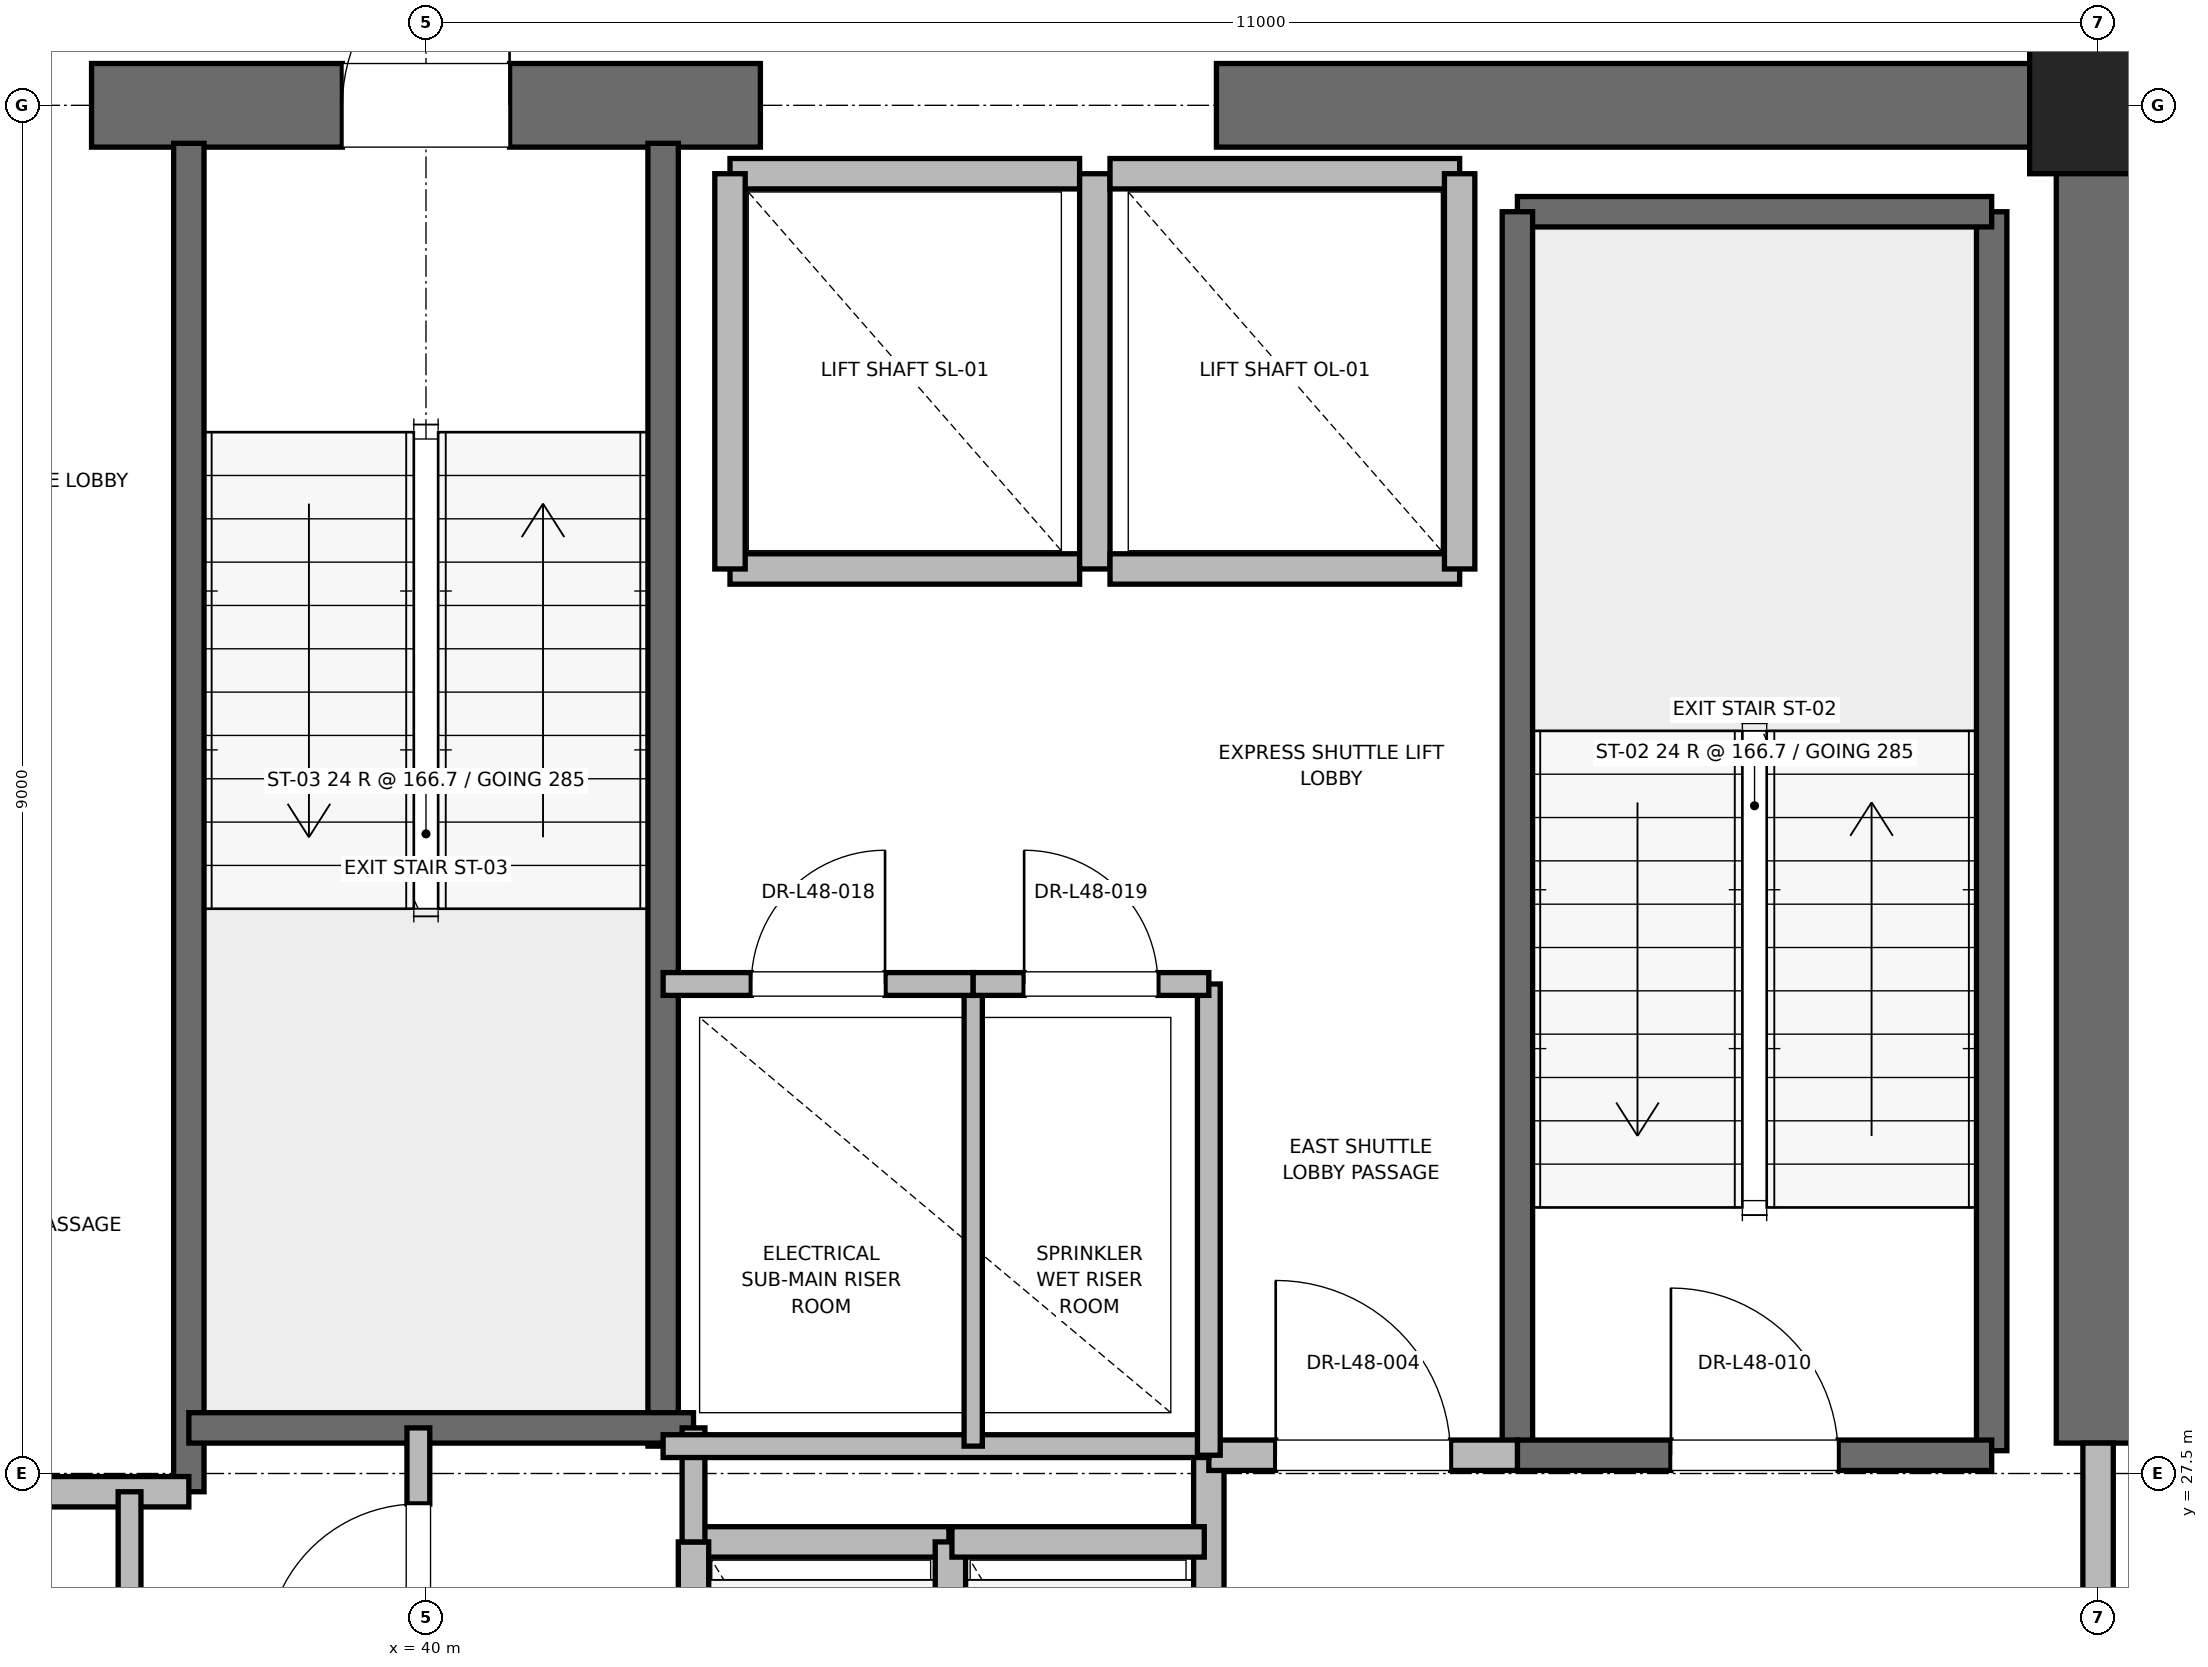
"""IFC4 building model, lengths in metres.
Left out: names, types, materials, properties, quantities, classifications, styles, units other than length and angle.
Written with IfcOpenShell. Run it as: python <this file> out.ifc"""

import sys

from ifc_helpers import new_model, si_unit, direction, frame, frame_2d, origin, origin_2d, place, context, subcontext, project, spatial, rectangle, extrude, element, fill, save


model = new_model("IFC4")
c1 = context("Model", 3, precision=1e-05, world=origin(), true_north=direction((0.0, 1.0)))
c2 = subcontext(c1, "Body", "Model", "MODEL_VIEW")
j1 = project(units=[si_unit("LENGTHUNIT", "METRE"), si_unit("PLANEANGLEUNIT", "RADIAN")], contexts=[c1])
p1 = place(None, origin())
s1 = spatial("IfcSite", under=j1, at=p1, CompositionType="ELEMENT")
p2 = place(p1, origin())
s2 = spatial("IfcBuilding", under=s1, at=p2, CompositionType="ELEMENT")
p3 = place(p2, frame((0.0, 0.0, 209.2)))
s3 = spatial("IfcBuildingStorey", under=s2, at=p3, CompositionType="ELEMENT", Elevation=209.2)
p4 = place(p3, frame((51.0, 36.5, 0.0), z_axis=(0.0, 0.0, 1.0), x_axis=(1.0, 0.0, 0.0)))
e1 = element("IfcColumn", 1, at=p4, inside=s3, PredefinedType="PILASTER", context=c2, shape_type="SweptSolid", body=[
    extrude(rectangle(XDim=0.9, YDim=0.9, at=origin_2d()), origin(), (0.0, 0.0, 1.0), 4.0),
])
p5 = place(p3, frame((37.8, 36.5, 0.0), z_axis=(0.0, 0.0, 1.0), x_axis=(1.0, 0.0, 0.0)))
e2 = element("IfcWall", 2, at=p5, inside=s3, PredefinedType="SHEAR", context=c2, shape_type="SweptSolid", body=[
    extrude(rectangle(XDim=4.4, YDim=0.55, at=frame_2d((2.2, 0.0))), origin(), (0.0, 0.0, 1.0), 3.775),
])
p6 = place(p5, frame((1.65, 0.0, 0.0)))
e3 = element("IfcOpeningElement", 3, at=p6, cuts=e2, PredefinedType="OPENING", context=c2, shape_type="SweptSolid", body=[
    extrude(rectangle(XDim=1.1, YDim=2.15, at=frame_2d((0.55, 1.075))), frame((0.0, 0.275, 0.0), z_axis=(0.0, -1.0, 0.0), x_axis=(1.0, 0.0, 0.0)), (0.0, 0.0, 1.0), 0.55),
])
p7 = place(p3, frame((45.2, 36.5, 0.0), z_axis=(0.0, 0.0, 1.0), x_axis=(1.0, 0.0, 0.0)))
e4 = element("IfcWall", 4, at=p7, inside=s3, PredefinedType="SHEAR", context=c2, shape_type="SweptSolid", body=[
    extrude(rectangle(XDim=5.8, YDim=0.55, at=frame_2d((2.9, 0.0))), origin(), (0.0, 0.0, 1.0), 3.775),
])
p8 = place(p3, frame((51.0, 27.7, 0.0), z_axis=(0.0, 0.0, 1.0), x_axis=(0.0, 1.0, 0.0)))
e5 = element("IfcWall", 5, at=p8, inside=s3, PredefinedType="SHEAR", context=c2, shape_type="SweptSolid", body=[
    extrude(rectangle(XDim=8.8, YDim=0.55, at=frame_2d((4.4, 0.0))), origin(), (0.0, 0.0, 1.0), 3.775),
])
p9 = place(p3, frame((50.3, 27.65, 0.0), z_axis=(0.0, 0.0, 1.0), x_axis=(0.0, 1.0, 0.0)))
e6 = element("IfcWall", 6, at=p9, inside=s3, PredefinedType="SOLIDWALL", context=c2, shape_type="SweptSolid", body=[
    extrude(rectangle(XDim=8.15, YDim=0.2, at=frame_2d((4.075, 0.0))), origin(), (0.0, 0.0, 1.0), 3.775),
])
p10 = place(p3, frame((47.18, 35.8, 0.0), z_axis=(0.0, 0.0, 1.0), x_axis=(1.0, 0.0, 0.0)))
e7 = element("IfcWall", 7, at=p10, inside=s3, PredefinedType="SOLIDWALL", context=c2, shape_type="SweptSolid", body=[
    extrude(rectangle(XDim=3.12, YDim=0.2, at=frame_2d((1.56, 0.0))), origin(), (0.0, 0.0, 1.0), 3.775),
])
p11 = place(p3, frame((47.18, 27.62, 0.0), z_axis=(0.0, 0.0, 1.0), x_axis=(0.0, 1.0, 0.0)))
e8 = element("IfcWall", 8, at=p11, inside=s3, PredefinedType="SOLIDWALL", context=c2, shape_type="SweptSolid", body=[
    extrude(rectangle(XDim=8.18, YDim=0.2, at=frame_2d((4.09, 0.0))), origin(), (0.0, 0.0, 1.0), 3.775),
])
p12 = place(p3, frame((47.18, 27.62, 0.0), z_axis=(0.0, 0.0, 1.0), x_axis=(1.0, 0.0, 0.0)))
e9 = element("IfcWall", 9, at=p12, inside=s3, PredefinedType="SOLIDWALL", context=c2, shape_type="SweptSolid", body=[
    extrude(rectangle(XDim=3.12, YDim=0.2, at=frame_2d((1.56, 0.0))), origin(), (0.0, 0.0, 1.0), 3.775),
])
p13 = place(p12, frame((1.01, 0.0, 0.0)))
e10 = element("IfcOpeningElement", 10, at=p13, cuts=e9, PredefinedType="OPENING", context=c2, shape_type="SweptSolid", body=[
    extrude(rectangle(XDim=1.1, YDim=2.15, at=frame_2d((0.55, 1.075))), frame((0.0, 0.1, 0.0), z_axis=(0.0, -1.0, 0.0), x_axis=(1.0, 0.0, 0.0)), (0.0, 0.0, 1.0), 0.2),
])
p14 = place(p3, frame((38.44, 27.38, 0.0), z_axis=(0.0, 0.0, 1.0), x_axis=(0.0, 1.0, 0.0)))
e11 = element("IfcWall", 11, at=p14, inside=s3, PredefinedType="SOLIDWALL", context=c2, shape_type="SweptSolid", body=[
    extrude(rectangle(XDim=8.87, YDim=0.2, at=frame_2d((4.435, 0.0))), origin(), (0.0, 0.0, 1.0), 3.775),
])
p15 = place(p3, frame((41.56, 27.68, 0.0), z_axis=(0.0, 0.0, 1.0), x_axis=(0.0, 1.0, 0.0)))
e12 = element("IfcWall", 12, at=p15, inside=s3, PredefinedType="SOLIDWALL", context=c2, shape_type="SweptSolid", body=[
    extrude(rectangle(XDim=8.57, YDim=0.2, at=frame_2d((4.285, 0.0))), origin(), (0.0, 0.0, 1.0), 3.775),
])
p16 = place(p3, frame((38.44, 27.8, 0.0), z_axis=(0.0, 0.0, 1.0), x_axis=(1.0, 0.0, 0.0)))
e13 = element("IfcWall", 13, at=p16, inside=s3, PredefinedType="SOLIDWALL", context=c2, shape_type="SweptSolid", body=[
    extrude(rectangle(XDim=3.32, YDim=0.2, at=frame_2d((1.66, 0.0))), origin(), (0.0, 0.0, 1.0), 3.775),
])
p17 = place(p3, frame((32.82, 27.38, 0.0), z_axis=(0.0, 0.0, 1.0), x_axis=(1.0, 0.0, 0.0)))
e14 = element("IfcWall", 14, at=p17, inside=s3, PredefinedType="PARTITIONING", context=c2, shape_type="SweptSolid", body=[
    extrude(rectangle(XDim=5.62, YDim=0.2, at=frame_2d((2.81, 0.0))), origin(), (0.0, 0.0, 1.0), 3.775),
])
p18 = place(p3, frame((45.15, 24.25, 0.0), z_axis=(0.0, 0.0, 1.0), x_axis=(0.0, 1.0, 0.0)))
e15 = element("IfcWall", 15, at=p18, inside=s3, PredefinedType="PARTITIONING", context=c2, shape_type="SweptSolid", body=[
    extrude(rectangle(XDim=3.37, YDim=0.2, at=frame_2d((1.685, 0.0))), origin(), (0.0, 0.0, 1.0), 3.775),
])
p19 = place(p3, frame((45.15, 27.62, 0.0), z_axis=(0.0, 0.0, 1.0), x_axis=(1.0, 0.0, 0.0)))
e16 = element("IfcWall", 16, at=p19, inside=s3, PredefinedType="PARTITIONING", context=c2, shape_type="SweptSolid", body=[
    extrude(rectangle(XDim=2.03, YDim=0.2, at=frame_2d((1.015, 0.0))), origin(), (0.0, 0.0, 1.0), 3.775),
])
p20 = place(p19, frame((0.44, 0.0, 0.0)))
e17 = element("IfcOpeningElement", 17, at=p20, cuts=e16, PredefinedType="OPENING", context=c2, shape_type="SweptSolid", body=[
    extrude(rectangle(XDim=1.15, YDim=2.2, at=frame_2d((0.575, 1.1))), frame((0.0, 0.1, 0.0), z_axis=(0.0, -1.0, 0.0), x_axis=(1.0, 0.0, 0.0)), (0.0, 0.0, 1.0), 0.2),
])
p21 = place(p3, frame((51.0, 24.3, 0.0), z_axis=(0.0, 0.0, 1.0), x_axis=(0.0, 1.0, 0.0)))
e18 = element("IfcWall", 18, at=p21, inside=s3, PredefinedType="PARTITIONING", context=c2, shape_type="SweptSolid", body=[
    extrude(rectangle(XDim=3.4, YDim=0.2, at=frame_2d((1.7, 0.0))), origin(), (0.0, 0.0, 1.0), 2.755),
])
p22 = place(p21, frame((1.125, 0.0, 0.0)))
e19 = element("IfcOpeningElement", 19, at=p22, cuts=e18, PredefinedType="OPENING", context=c2, shape_type="SweptSolid", body=[
    extrude(rectangle(XDim=1.15, YDim=2.2, at=frame_2d((0.575, 1.1))), frame((0.0, 0.1, 0.0), z_axis=(0.0, -1.0, 0.0), x_axis=(1.0, 0.0, 0.0)), (0.0, 0.0, 1.0), 0.2),
])
p23 = place(p3, frame((43.44, 27.05, 0.0), z_axis=(0.0, 0.0, 1.0), x_axis=(-1.0, 0.0, 0.0)))
e20 = element("IfcWall", 20, at=p23, inside=s3, PredefinedType="SOLIDWALL", context=c2, shape_type="SweptSolid", body=[
    extrude(rectangle(XDim=1.68, YDim=0.2, at=frame_2d((0.84, 0.0))), origin(), (0.0, 0.0, 1.0), 3.775),
])
for number, where, z_axis, x_axis in (
    (21, (41.76, 27.05, 0.0), (0.0, 0.0, 1.0), (0.0, -1.0, 0.0)),
    (22, (43.45, 24.45, 0.0), (0.0, 0.0, 1.0), (0.0, 1.0, 0.0)),
):
    element("IfcWall", number, at=place(p3, frame(where, z_axis=z_axis, x_axis=x_axis)), inside=s3, PredefinedType="SOLIDWALL", context=c2, shape_type="SweptSolid", body=[
        extrude(rectangle(XDim=2.6, YDim=0.2, at=frame_2d((1.3, 0.0))), origin(), (0.0, 0.0, 1.0), 3.775),
    ])
p24 = place(p3, frame((45.12, 27.05, 0.0), z_axis=(0.0, 0.0, 1.0), x_axis=(-1.0, 0.0, 0.0)))
e23 = element("IfcWall", 23, at=p24, inside=s3, PredefinedType="SOLIDWALL", context=c2, shape_type="SweptSolid", body=[
    extrude(rectangle(XDim=1.66, YDim=0.2, at=frame_2d((0.83, 0.0))), origin(), (0.0, 0.0, 1.0), 3.775),
])
p25 = place(p3, frame((42.0, 33.45, 0.0), z_axis=(0.0, 0.0, 1.0), x_axis=(1.0, 0.0, 0.0)))
e24 = element("IfcWall", 24, at=p25, inside=s3, PredefinedType="SOLIDWALL", context=c2, shape_type="SweptSolid", body=[
    extrude(rectangle(XDim=2.3, YDim=0.2, at=frame_2d((1.15, 0.0))), origin(), (0.0, 0.0, 1.0), 3.775),
])
p26 = place(p3, frame((44.3, 36.05, 0.0), z_axis=(0.0, 0.0, 1.0), x_axis=(-1.0, 0.0, 0.0)))
e25 = element("IfcWall", 25, at=p26, inside=s3, PredefinedType="SOLIDWALL", context=c2, shape_type="SweptSolid", body=[
    extrude(rectangle(XDim=2.3, YDim=0.2, at=frame_2d((1.15, 0.0))), origin(), (0.0, 0.0, 1.0), 2.755),
])
for number, where, z_axis, x_axis in (
    (26, (42.0, 36.05, 0.0), (0.0, 0.0, 1.0), (0.0, -1.0, 0.0)),
    (27, (44.4, 33.45, 0.0), (0.0, 0.0, 1.0), (0.0, 1.0, 0.0)),
):
    element("IfcWall", number, at=place(p3, frame(where, z_axis=z_axis, x_axis=x_axis)), inside=s3, PredefinedType="SOLIDWALL", context=c2, shape_type="SweptSolid", body=[
        extrude(rectangle(XDim=2.6, YDim=0.2, at=frame_2d((1.3, 0.0))), origin(), (0.0, 0.0, 1.0), 2.755),
    ])
p27 = place(p3, frame((44.5, 33.45, 0.0), z_axis=(0.0, 0.0, 1.0), x_axis=(1.0, 0.0, 0.0)))
e28 = element("IfcWall", 28, at=p27, inside=s3, PredefinedType="SOLIDWALL", context=c2, shape_type="SweptSolid", body=[
    extrude(rectangle(XDim=2.3, YDim=0.2, at=frame_2d((1.15, 0.0))), origin(), (0.0, 0.0, 1.0), 3.775),
])
p28 = place(p3, frame((46.8, 36.05, 0.0), z_axis=(0.0, 0.0, 1.0), x_axis=(-1.0, 0.0, 0.0)))
e29 = element("IfcWall", 29, at=p28, inside=s3, PredefinedType="SOLIDWALL", context=c2, shape_type="SweptSolid", body=[
    extrude(rectangle(XDim=2.3, YDim=0.2, at=frame_2d((1.15, 0.0))), origin(), (0.0, 0.0, 1.0), 2.755),
])
p29 = place(p3, frame((46.8, 33.45, 0.0), z_axis=(0.0, 0.0, 1.0), x_axis=(0.0, 1.0, 0.0)))
e30 = element("IfcWall", 30, at=p29, inside=s3, PredefinedType="SOLIDWALL", context=c2, shape_type="SweptSolid", body=[
    extrude(rectangle(XDim=2.6, YDim=0.2, at=frame_2d((1.3, 0.0))), origin(), (0.0, 0.0, 1.0), 3.775),
])
p30 = place(p3, frame((41.76, 27.05, 0.0), z_axis=(0.0, 0.0, 1.0), x_axis=(0.0, 1.0, 0.0)))
e31 = element("IfcWall", 31, at=p30, inside=s3, PredefinedType="PARTITIONING", context=c2, shape_type="SweptSolid", body=[
    extrude(rectangle(XDim=0.75, YDim=0.15, at=frame_2d((0.375, 0.0))), origin(), (0.0, 0.0, 1.0), 2.85),
])
p31 = place(p3, frame((39.95, 25.8, 0.0), z_axis=(0.0, 0.0, 1.0), x_axis=(0.0, 1.0, 0.0)))
e32 = element("IfcWall", 32, at=p31, inside=s3, PredefinedType="PARTITIONING", context=c2, shape_type="SweptSolid", body=[
    extrude(rectangle(XDim=2.0, YDim=0.15, at=frame_2d((1.0, 0.0))), origin(), (0.0, 0.0, 1.0), 2.85),
])
p32 = place(p31, frame((0.5, 0.0, 0.0)))
e33 = element("IfcOpeningElement", 33, at=p32, cuts=e32, PredefinedType="OPENING", context=c2, shape_type="SweptSolid", body=[
    extrude(rectangle(XDim=1.0, YDim=2.15, at=frame_2d((0.5, 1.075))), frame((0.0, 0.075, 0.0), z_axis=(0.0, -1.0, 0.0), x_axis=(1.0, 0.0, 0.0)), (0.0, 0.0, 1.0), 0.15),
])
p33 = place(p3, frame((38.05, 24.5, 0.0), z_axis=(0.0, 0.0, 1.0), x_axis=(0.0, 1.0, 0.0)))
e34 = element("IfcWall", 34, at=p33, inside=s3, PredefinedType="PARTITIONING", context=c2, shape_type="SweptSolid", body=[
    extrude(rectangle(XDim=2.88, YDim=0.15, at=frame_2d((1.44, 0.0))), origin(), (0.0, 0.0, 1.0), 2.85),
])
p34 = place(p33, frame((0.94, 0.0, 0.0)))
e35 = element("IfcOpeningElement", 35, at=p34, cuts=e34, PredefinedType="OPENING", context=c2, shape_type="SweptSolid", body=[
    extrude(rectangle(XDim=1.0, YDim=2.15, at=frame_2d((0.5, 1.075))), frame((0.0, 0.075, 0.0), z_axis=(0.0, -1.0, 0.0), x_axis=(1.0, 0.0, 0.0)), (0.0, 0.0, 1.0), 0.15),
])
p35 = place(p3, frame((41.56, 27.68, 0.0), z_axis=(0.0, 0.0, 1.0), x_axis=(1.0, 0.0, 0.0)))
e36 = element("IfcWall", 36, at=p35, inside=s3, PredefinedType="PARTITIONING", context=c2, shape_type="SweptSolid", body=[
    extrude(rectangle(XDim=3.59, YDim=0.15, at=frame_2d((1.795, 0.0))), origin(), (0.0, 0.0, 1.0), 2.85),
])
p36 = place(p3, frame((45.15, 27.62, 0.0), z_axis=(0.0, 0.0, 1.0), x_axis=(0.0, 1.0, 0.0)))
e37 = element("IfcWall", 37, at=p36, inside=s3, PredefinedType="PARTITIONING", context=c2, shape_type="SweptSolid", body=[
    extrude(rectangle(XDim=3.1, YDim=0.15, at=frame_2d((1.55, 0.0))), origin(), (0.0, 0.0, 1.0), 2.85),
])
p37 = place(p3, frame((43.6, 27.68, 0.0), z_axis=(0.0, 0.0, 1.0), x_axis=(0.0, 1.0, 0.0)))
e38 = element("IfcWall", 38, at=p37, inside=s3, PredefinedType="PARTITIONING", context=c2, shape_type="SweptSolid", body=[
    extrude(rectangle(XDim=3.04, YDim=0.12, at=frame_2d((1.52, 0.0))), origin(), (0.0, 0.0, 1.0), 2.85),
])
p38 = place(p3, frame((41.56, 30.72, 0.0), z_axis=(0.0, 0.0, 1.0), x_axis=(1.0, 0.0, 0.0)))
e39 = element("IfcWall", 39, at=p38, inside=s3, PredefinedType="PARTITIONING", context=c2, shape_type="SweptSolid", body=[
    extrude(rectangle(XDim=2.04, YDim=0.15, at=frame_2d((1.02, 0.0))), origin(), (0.0, 0.0, 1.0), 2.85),
])
p39 = place(p38, frame((0.58, 0.0, 0.0)))
e40 = element("IfcOpeningElement", 40, at=p39, cuts=e39, PredefinedType="OPENING", context=c2, shape_type="SweptSolid", body=[
    extrude(rectangle(XDim=0.88, YDim=2.1, at=frame_2d((0.44, 1.05))), frame((0.0, 0.075, 0.0), z_axis=(0.0, -1.0, 0.0), x_axis=(1.0, 0.0, 0.0)), (0.0, 0.0, 1.0), 0.15),
])
p40 = place(p3, frame((43.6, 30.72, 0.0), z_axis=(0.0, 0.0, 1.0), x_axis=(1.0, 0.0, 0.0)))
e41 = element("IfcWall", 41, at=p40, inside=s3, PredefinedType="PARTITIONING", context=c2, shape_type="SweptSolid", body=[
    extrude(rectangle(XDim=1.55, YDim=0.15, at=frame_2d((0.775, 0.0))), origin(), (0.0, 0.0, 1.0), 2.85),
])
p41 = place(p40, frame((0.335, 0.0, 0.0)))
e42 = element("IfcOpeningElement", 42, at=p41, cuts=e41, PredefinedType="OPENING", context=c2, shape_type="SweptSolid", body=[
    extrude(rectangle(XDim=0.88, YDim=2.1, at=frame_2d((0.44, 1.05))), frame((0.0, 0.075, 0.0), z_axis=(0.0, -1.0, 0.0), x_axis=(1.0, 0.0, 0.0)), (0.0, 0.0, 1.0), 0.15),
])
p42 = place(p13, origin())
e43 = element("IfcDoor", 43, at=p42, inside=s3, OperationType="SINGLE_SWING_LEFT", PredefinedType="DOOR", context=c2, shape_type="SweptSolid", body=[
    extrude(rectangle(XDim=1.1, YDim=2.15, at=frame_2d((0.55, 1.075))), frame((0.0, 0.025, 0.0), z_axis=(0.0, -1.0, 0.0), x_axis=(1.0, 0.0, 0.0)), (0.0, 0.0, 1.0), 0.05),
])
fill(e10, e43)
p43 = place(p6, origin())
e44 = element("IfcDoor", 44, at=p43, inside=s3, OperationType="SINGLE_SWING_RIGHT", PredefinedType="DOOR", context=c2, shape_type="SweptSolid", body=[
    extrude(rectangle(XDim=1.1, YDim=2.15, at=frame_2d((0.55, 1.075))), frame((0.0, 0.025, 0.0), z_axis=(0.0, -1.0, 0.0), x_axis=(1.0, 0.0, 0.0)), (0.0, 0.0, 1.0), 0.05),
])
fill(e3, e44)
p44 = place(p20, origin())
e45 = element("IfcDoor", 45, at=p44, inside=s3, OperationType="SINGLE_SWING_LEFT", PredefinedType="DOOR", context=c2, shape_type="SweptSolid", body=[
    extrude(rectangle(XDim=1.15, YDim=2.2, at=frame_2d((0.575, 1.1))), frame((0.0, 0.025, 0.0), z_axis=(0.0, -1.0, 0.0), x_axis=(1.0, 0.0, 0.0)), (0.0, 0.0, 1.0), 0.05),
])
fill(e17, e45)
p45 = place(p32, origin())
e46 = element("IfcDoor", 46, at=p45, inside=s3, OperationType="SINGLE_SWING_LEFT", PredefinedType="DOOR", context=c2, shape_type="SweptSolid", body=[
    extrude(rectangle(XDim=1.0, YDim=2.15, at=frame_2d((0.5, 1.075))), frame((0.0, 0.025, 0.0), z_axis=(0.0, -1.0, 0.0), x_axis=(1.0, 0.0, 0.0)), (0.0, 0.0, 1.0), 0.05),
])
fill(e33, e46)
p46 = place(p39, origin())
e47 = element("IfcDoor", 47, at=p46, inside=s3, OperationType="SINGLE_SWING_RIGHT", PredefinedType="DOOR", context=c2, shape_type="SweptSolid", body=[
    extrude(rectangle(XDim=0.88, YDim=2.1, at=frame_2d((0.44, 1.05))), frame((0.0, 0.025, 0.0), z_axis=(0.0, -1.0, 0.0), x_axis=(1.0, 0.0, 0.0)), (0.0, 0.0, 1.0), 0.05),
])
fill(e40, e47)
p47 = place(p41, origin())
e48 = element("IfcDoor", 48, at=p47, inside=s3, OperationType="SINGLE_SWING_LEFT", PredefinedType="DOOR", context=c2, shape_type="SweptSolid", body=[
    extrude(rectangle(XDim=0.88, YDim=2.1, at=frame_2d((0.44, 1.05))), frame((0.0, 0.025, 0.0), z_axis=(0.0, -1.0, 0.0), x_axis=(1.0, 0.0, 0.0)), (0.0, 0.0, 1.0), 0.05),
])
fill(e42, e48)
save(model, sys.argv[1])
